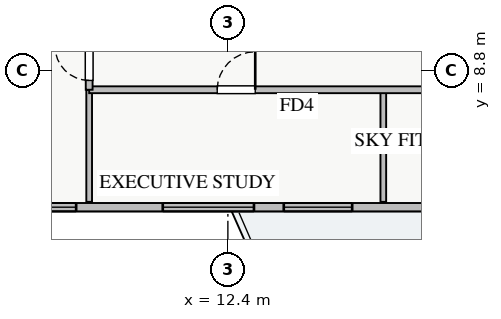
"""IFC4 building model, lengths in metres.
Left out: names, types, materials, properties, quantities, classifications, styles, units other than length and angle.
Written with IfcOpenShell. Run it as: python <this file> out.ifc"""

import sys

from ifc_helpers import new_model, si_unit, direction, frame, frame_2d, origin, place, context, subcontext, project, spatial, rectangle, extrude, source, transform, mapped, element, fill, save


model = new_model("IFC4")
c1 = context("Model", 3, precision=1e-05, world=origin(), true_north=direction((0.0, 1.0)))
c2 = subcontext(c1, "Body", "Model", "MODEL_VIEW")
j1 = project(units=[si_unit("LENGTHUNIT", "METRE"), si_unit("PLANEANGLEUNIT", "RADIAN")], contexts=[c1])
p1 = place(None, origin())
s1 = spatial("IfcSite", under=j1, at=p1, CompositionType="ELEMENT")
p2 = place(p1, origin())
s2 = spatial("IfcBuilding", under=s1, at=p2, CompositionType="ELEMENT")
p3 = place(p2, frame((0.0, 0.0, 106.75)))
s3 = spatial("IfcBuildingStorey", under=s2, at=p3, CompositionType="ELEMENT", Elevation=106.75)
p4 = place(p3, frame((6.55, 5.21, 0.0), z_axis=(0.0, 0.0, 1.0), x_axis=(1.0, 0.0, 0.0)))
e1 = element("IfcWall", 1, at=p4, inside=s3, PredefinedType="STANDARD", context=c2, shape_type="SweptSolid", body=[
    extrude(rectangle(XDim=24.9, YDim=0.22, at=frame_2d((12.45, 0.0))), origin(), (0.0, 0.0, 1.0), 2.61),
])
p5 = place(p4, frame((13.3, 0.0, 0.0)))
e2 = element("IfcOpeningElement", 2, at=p5, cuts=e1, PredefinedType="OPENING", context=c2, shape_type="SweptSolid", body=[
    extrude(rectangle(XDim=1.2, YDim=2.1, at=frame_2d((0.6, 1.05))), frame((0.0, 0.12, 0.0), z_axis=(0.0, -1.0, 0.0), x_axis=(1.0, 0.0, 0.0)), (0.0, 0.0, 1.0), 0.24),
])
p6 = place(p4, frame((0.357, 0.0, 0.9)))
e3 = element("IfcOpeningElement", 3, at=p6, cuts=e1, PredefinedType="OPENING", context=c2, shape_type="SweptSolid", body=[
    extrude(rectangle(XDim=1.5, YDim=1.5, at=frame_2d((0.75, 0.75))), frame((0.0, 0.12, 0.0), z_axis=(0.0, -1.0, 0.0), x_axis=(1.0, 0.0, 0.0)), (0.0, 0.0, 1.0), 0.24),
])
p7 = place(p4, frame((7.321, 0.0, 0.9)))
e4 = element("IfcOpeningElement", 4, at=p7, cuts=e1, PredefinedType="OPENING", context=c2, shape_type="SweptSolid", body=[
    extrude(rectangle(XDim=1.8, YDim=1.5, at=frame_2d((0.9, 0.75))), frame((0.0, 0.12, 0.0), z_axis=(0.0, -1.0, 0.0), x_axis=(1.0, 0.0, 0.0)), (0.0, 0.0, 1.0), 0.24),
])
p8 = place(p4, frame((14.813, 0.0, 0.9)))
e5 = element("IfcOpeningElement", 5, at=p8, cuts=e1, PredefinedType="OPENING", context=c2, shape_type="SweptSolid", body=[
    extrude(rectangle(XDim=1.5, YDim=1.45, at=frame_2d((0.75, 0.725))), frame((0.0, 0.12, 0.0), z_axis=(0.0, -1.0, 0.0), x_axis=(1.0, 0.0, 0.0)), (0.0, 0.0, 1.0), 0.24),
])
p9 = place(p4, frame((20.738, 0.0, 0.9)))
e6 = element("IfcOpeningElement", 6, at=p9, cuts=e1, PredefinedType="OPENING", context=c2, shape_type="SweptSolid", body=[
    extrude(rectangle(XDim=2.1, YDim=1.48, at=frame_2d((1.05, 0.74))), frame((0.0, 0.12, 0.0), z_axis=(0.0, -1.0, 0.0), x_axis=(1.0, 0.0, 0.0)), (0.0, 0.0, 1.0), 0.24),
])
p10 = place(p4, frame((4.136, 0.0, 0.9)))
e7 = element("IfcOpeningElement", 7, at=p10, cuts=e1, PredefinedType="OPENING", context=c2, shape_type="SweptSolid", body=[
    extrude(rectangle(XDim=2.4, YDim=1.5, at=frame_2d((1.2, 0.75))), frame((0.0, 0.12, 0.0), z_axis=(0.0, -1.0, 0.0), x_axis=(1.0, 0.0, 0.0)), (0.0, 0.0, 1.0), 0.24),
])
for number, where, z_axis, x_axis in (
    (8, (16.49, 5.35, 0.0), (0.0, 0.0, 1.0), (0.0, 1.0, 0.0)),
    (9, (8.75, 5.35, 0.0), (0.0, 0.0, 1.0), (0.0, 1.0, 0.0)),
):
    element("IfcWall", number, at=place(p3, frame(where, z_axis=z_axis, x_axis=x_axis)), inside=s3, PredefinedType="PARTITIONING", context=c2, shape_type="SweptSolid", body=[
        extrude(rectangle(XDim=2.95, YDim=0.15, at=frame_2d((1.475, 0.0))), origin(), (0.0, 0.0, 1.0), 3.07),
    ])
p11 = place(p3, frame((8.75, 8.3, 0.0), z_axis=(0.0, 0.0, 1.0), x_axis=(1.0, 0.0, 0.0)))
e10 = element("IfcWall", 10, at=p11, inside=s3, PredefinedType="PARTITIONING", context=c2, shape_type="SweptSolid", body=[
    extrude(rectangle(XDim=23.61, YDim=0.18, at=frame_2d((11.805, 0.0))), origin(), (0.0, 0.0, 1.0), 3.07),
])
p12 = place(p11, frame((3.37, 0.0, 0.0)))
e11 = element("IfcOpeningElement", 11, at=p12, cuts=e10, PredefinedType="OPENING", context=c2, shape_type="SweptSolid", body=[
    extrude(rectangle(XDim=1.0, YDim=2.05, at=frame_2d((0.5, 1.025))), frame((0.0, 0.1, 0.0), z_axis=(0.0, -1.0, 0.0), x_axis=(1.0, 0.0, 0.0)), (0.0, 0.0, 1.0), 0.2),
])
p13 = place(p11, frame((11.115, 0.0, 0.0)))
e12 = element("IfcOpeningElement", 12, at=p13, cuts=e10, PredefinedType="OPENING", context=c2, shape_type="SweptSolid", body=[
    extrude(rectangle(XDim=1.0, YDim=2.05, at=frame_2d((0.5, 1.025))), frame((0.0, 0.1, 0.0), z_axis=(0.0, -1.0, 0.0), x_axis=(1.0, 0.0, 0.0)), (0.0, 0.0, 1.0), 0.2),
])
p14 = place(p11, frame((18.86, 0.0, 0.0)))
e13 = element("IfcOpeningElement", 13, at=p14, cuts=e10, PredefinedType="OPENING", context=c2, shape_type="SweptSolid", body=[
    extrude(rectangle(XDim=1.0, YDim=2.05, at=frame_2d((0.5, 1.025))), frame((0.0, 0.1, 0.0), z_axis=(0.0, -1.0, 0.0), x_axis=(1.0, 0.0, 0.0)), (0.0, 0.0, 1.0), 0.2),
])
p15 = place(p3, frame((8.75, 8.3, 0.0), z_axis=(0.0, 0.0, 1.0), x_axis=(0.0, 1.0, 0.0)))
e14 = element("IfcWall", 14, at=p15, inside=s3, PredefinedType="PARTITIONING", context=c2, shape_type="SweptSolid", body=[
    extrude(rectangle(XDim=29.4, YDim=0.18, at=frame_2d((14.7, 0.0))), origin(), (0.0, 0.0, 1.0), 3.07),
])
p16 = place(p15, frame((28.08, 0.0, 0.0)))
e15 = element("IfcOpeningElement", 15, at=p16, cuts=e14, PredefinedType="OPENING", context=c2, shape_type="SweptSolid", body=[
    extrude(rectangle(XDim=0.9, YDim=2.05, at=frame_2d((0.45, 1.025))), frame((0.0, 0.1, 0.0), z_axis=(0.0, -1.0, 0.0), x_axis=(1.0, 0.0, 0.0)), (0.0, 0.0, 1.0), 0.2),
])
p17 = place(p15, frame((0.245, 0.0, 0.0)))
e16 = element("IfcOpeningElement", 16, at=p17, cuts=e14, PredefinedType="OPENING", context=c2, shape_type="SweptSolid", body=[
    extrude(rectangle(XDim=0.9, YDim=2.05, at=frame_2d((0.45, 1.025))), frame((0.0, 0.1, 0.0), z_axis=(0.0, -1.0, 0.0), x_axis=(1.0, 0.0, 0.0)), (0.0, 0.0, 1.0), 0.2),
])
p18 = place(p15, frame((2.95, 0.0, 0.0)))
e17 = element("IfcOpeningElement", 17, at=p18, cuts=e14, PredefinedType="OPENING", context=c2, shape_type="SweptSolid", body=[
    extrude(rectangle(XDim=1.0, YDim=2.05, at=frame_2d((0.5, 1.025))), frame((0.0, 0.1, 0.0), z_axis=(0.0, -1.0, 0.0), x_axis=(1.0, 0.0, 0.0)), (0.0, 0.0, 1.0), 0.2),
])
p19 = place(p15, frame((12.08, 0.0, 0.0)))
e18 = element("IfcOpeningElement", 18, at=p19, cuts=e14, PredefinedType="OPENING", context=c2, shape_type="SweptSolid", body=[
    extrude(rectangle(XDim=1.0, YDim=2.05, at=frame_2d((0.5, 1.025))), frame((0.0, 0.1, 0.0), z_axis=(0.0, -1.0, 0.0), x_axis=(1.0, 0.0, 0.0)), (0.0, 0.0, 1.0), 0.2),
])
p20 = place(p15, frame((22.795, 0.0, 0.0)))
e19 = element("IfcOpeningElement", 19, at=p20, cuts=e14, PredefinedType="OPENING", context=c2, shape_type="SweptSolid", body=[
    extrude(rectangle(XDim=1.0, YDim=2.05, at=frame_2d((0.5, 1.025))), frame((0.0, 0.1, 0.0), z_axis=(0.0, -1.0, 0.0), x_axis=(1.0, 0.0, 0.0)), (0.0, 0.0, 1.0), 0.2),
])
m1 = source(origin(), c2, "Body", "SweptSolid", [
    extrude(rectangle(XDim=1.5, YDim=1.5, at=frame_2d((0.75, 0.75))), frame((0.0, 0.03, 0.0), z_axis=(0.0, -1.0, 0.0), x_axis=(1.0, 0.0, 0.0)), (0.0, 0.0, 1.0), 0.06),
])
p21 = place(p6, origin())
e20 = element("IfcWindow", 20, at=p21, inside=s3, PartitioningType="TRIPLE_PANEL_VERTICAL", PredefinedType="WINDOW", context=c2, shape_type="MappedRepresentation", body=[
    mapped(m1, transform((0.0, 0.0, 0.0), x_axis=(1.0, 0.0, 0.0), y_axis=(0.0, 1.0, 0.0), z_axis=(0.0, 0.0, 1.0), scale=1.0)),
])
fill(e3, e20)
m2 = source(origin(), c2, "Body", "SweptSolid", [
    extrude(rectangle(XDim=1.8, YDim=1.5, at=frame_2d((0.9, 0.75))), frame((0.0, 0.03, 0.0), z_axis=(0.0, -1.0, 0.0), x_axis=(1.0, 0.0, 0.0)), (0.0, 0.0, 1.0), 0.06),
])
p22 = place(p7, origin())
e21 = element("IfcWindow", 21, at=p22, inside=s3, PartitioningType="DOUBLE_PANEL_VERTICAL", PredefinedType="WINDOW", context=c2, shape_type="MappedRepresentation", body=[
    mapped(m2, transform((0.0, 0.0, 0.0), x_axis=(1.0, 0.0, 0.0), y_axis=(0.0, 1.0, 0.0), z_axis=(0.0, 0.0, 1.0), scale=1.0)),
])
fill(e4, e21)
m3 = source(origin(), c2, "Body", "SweptSolid", [
    extrude(rectangle(XDim=1.0, YDim=2.05, at=frame_2d((0.5, 1.025))), frame((0.0, 0.025, 0.0), z_axis=(0.0, -1.0, 0.0), x_axis=(1.0, 0.0, 0.0)), (0.0, 0.0, 1.0), 0.05),
])
p23 = place(p12, origin())
e22 = element("IfcDoor", 22, at=p23, inside=s3, OperationType="SINGLE_SWING_RIGHT", PredefinedType="DOOR", context=c2, shape_type="MappedRepresentation", body=[
    mapped(m3, transform((0.0, 0.0, 0.0), x_axis=(1.0, 0.0, 0.0), y_axis=(0.0, 1.0, 0.0), z_axis=(0.0, 0.0, 1.0), scale=1.0)),
])
fill(e11, e22)
m4 = source(origin(), c2, "Body", "SweptSolid", [
    extrude(rectangle(XDim=0.9, YDim=2.05, at=frame_2d((0.45, 1.025))), frame((0.0, 0.025, 0.0), z_axis=(0.0, -1.0, 0.0), x_axis=(1.0, 0.0, 0.0)), (0.0, 0.0, 1.0), 0.05),
])
p24 = place(p17, origin())
e23 = element("IfcDoor", 23, at=p24, inside=s3, OperationType="SINGLE_SWING_RIGHT", PredefinedType="DOOR", context=c2, shape_type="MappedRepresentation", body=[
    mapped(m4, transform((0.0, 0.0, 0.0), x_axis=(1.0, 0.0, 0.0), y_axis=(0.0, 1.0, 0.0), z_axis=(0.0, 0.0, 1.0), scale=1.0)),
])
fill(e16, e23)
m5 = source(origin(), c2, "Body", "SweptSolid", [
    extrude(rectangle(XDim=2.4, YDim=1.5, at=frame_2d((1.2, 0.75))), frame((0.0, 0.03, 0.0), z_axis=(0.0, -1.0, 0.0), x_axis=(1.0, 0.0, 0.0)), (0.0, 0.0, 1.0), 0.06),
])
p25 = place(p10, origin())
e24 = element("IfcWindow", 24, at=p25, inside=s3, PartitioningType="TRIPLE_PANEL_VERTICAL", PredefinedType="WINDOW", context=c2, shape_type="MappedRepresentation", body=[
    mapped(m5, transform((0.0, 0.0, 0.0), x_axis=(1.0, 0.0, 0.0), y_axis=(0.0, 1.0, 0.0), z_axis=(0.0, 0.0, 1.0), scale=1.0)),
])
fill(e7, e24)
save(model, sys.argv[1])
